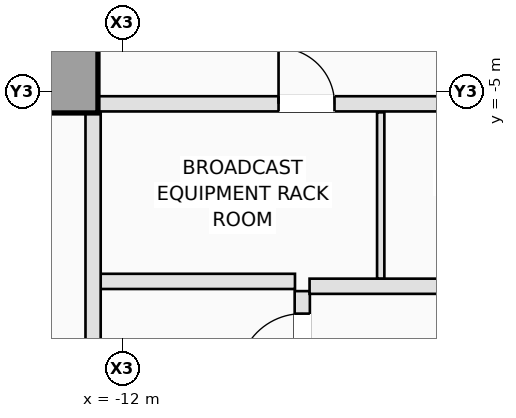
"""IFC4 building model, lengths in metres.
Left out: names, types, materials, properties, quantities, classifications, styles, units other than length and angle.
Written with IfcOpenShell. Run it as: python <this file> out.ifc"""

import sys

from ifc_helpers import new_model, si_unit, direction, frame, frame_2d, origin, origin_2d, place, context, subcontext, project, spatial, rectangle, extrude, element, fill, save


model = new_model("IFC4")
c1 = context("Model", 3, precision=1e-05, world=origin(), true_north=direction((0.0, 1.0)))
c2 = subcontext(c1, "Body", "Model", "MODEL_VIEW")
j1 = project(units=[si_unit("LENGTHUNIT", "METRE"), si_unit("PLANEANGLEUNIT", "RADIAN")], contexts=[c1])
p1 = place(None, origin())
s1 = spatial("IfcSite", under=j1, at=p1, CompositionType="ELEMENT")
p2 = place(p1, origin())
s2 = spatial("IfcBuilding", under=s1, at=p2, CompositionType="ELEMENT")
p3 = place(p2, frame((0.0, 0.0, 116.0)))
s3 = spatial("IfcBuildingStorey", under=s2, at=p3, CompositionType="ELEMENT", Elevation=116.0)
p4 = place(p3, frame((-12.95, -4.8, 0.0), z_axis=(0.0, 0.0, 1.0), x_axis=(1.0, 0.0, 0.0)))
e1 = element("IfcColumn", 1, at=p4, inside=s3, PredefinedType="COLUMN", context=c2, shape_type="SweptSolid", body=[
    extrude(rectangle(XDim=1.1, YDim=1.1, at=origin_2d()), origin(), (0.0, 0.0, 1.0), 3.5),
])
p5 = place(p3, frame((-9.04, -10.18, 0.0), z_axis=(0.0, 0.0, 1.0), x_axis=(0.0, 1.0, 0.0)))
e2 = element("IfcWall", 2, at=p5, inside=s3, PredefinedType="PARTITIONING", context=c2, shape_type="SweptSolid", body=[
    extrude(rectangle(XDim=1.9, YDim=0.25, at=frame_2d((0.95, 0.0))), origin(), (0.0, 0.0, 1.0), 3.25),
])
p6 = place(p5, frame((0.48, 0.0, 0.0)))
e3 = element("IfcOpeningElement", 3, at=p6, cuts=e2, PredefinedType="OPENING", context=c2, shape_type="SweptSolid", body=[
    extrude(rectangle(XDim=1.05, YDim=2.15, at=frame_2d((0.525, 1.075))), frame((0.0, 0.135, 0.0), z_axis=(0.0, -1.0, 0.0), x_axis=(1.0, 0.0, 0.0)), (0.0, 0.0, 1.0), 0.27),
])
p7 = place(p3, frame((-12.38, -8.12, 0.0), z_axis=(0.0, 0.0, 1.0), x_axis=(1.0, 0.0, 0.0)))
e4 = element("IfcWall", 4, at=p7, inside=s3, PredefinedType="PARTITIONING", context=c2, shape_type="SweptSolid", body=[
    extrude(rectangle(XDim=3.22, YDim=0.25, at=frame_2d((1.61, 0.0))), origin(), (0.0, 0.0, 1.0), 3.25),
])
p8 = place(p3, frame((-12.48, -10.18, 0.0), z_axis=(0.0, 0.0, 1.0), x_axis=(0.0, 1.0, 0.0)))
e5 = element("IfcWall", 5, at=p8, inside=s3, PredefinedType="PARTITIONING", context=c2, shape_type="SweptSolid", body=[
    extrude(rectangle(XDim=4.828, YDim=0.25, at=frame_2d((2.414, 0.0))), origin(), (0.0, 0.0, 1.0), 3.25),
])
p9 = place(p3, frame((-8.92, -8.2, 0.0), z_axis=(0.0, 0.0, 1.0), x_axis=(1.0, 0.0, 0.0)))
e6 = element("IfcWall", 6, at=p9, inside=s3, PredefinedType="PARTITIONING", context=c2, shape_type="SweptSolid", body=[
    extrude(rectangle(XDim=5.24, YDim=0.25, at=frame_2d((2.62, 0.0))), origin(), (0.0, 0.0, 1.0), 3.25),
])
p10 = place(p3, frame((-12.398, -5.2, 0.0), z_axis=(0.0, 0.0, 1.0), x_axis=(1.0, 0.0, 0.0)))
e7 = element("IfcWall", 7, at=p10, inside=s3, PredefinedType="PARTITIONING", context=c2, shape_type="SweptSolid", body=[
    extrude(rectangle(XDim=8.096, YDim=0.25, at=frame_2d((4.048, 0.0))), origin(), (0.0, 0.0, 1.0), 3.25),
])
p11 = place(p10, frame((2.968, 0.0, 0.0)))
e8 = element("IfcOpeningElement", 8, at=p11, cuts=e7, PredefinedType="OPENING", context=c2, shape_type="SweptSolid", body=[
    extrude(rectangle(XDim=0.92, YDim=2.12, at=frame_2d((0.46, 1.06))), frame((0.0, 0.135, 0.0), z_axis=(0.0, -1.0, 0.0), x_axis=(1.0, 0.0, 0.0)), (0.0, 0.0, 1.0), 0.27),
])
p12 = place(p10, frame((6.068, 0.0, 0.0)))
e9 = element("IfcOpeningElement", 9, at=p12, cuts=e7, PredefinedType="OPENING", context=c2, shape_type="SweptSolid", body=[
    extrude(rectangle(XDim=0.92, YDim=2.12, at=frame_2d((0.46, 1.06))), frame((0.0, 0.135, 0.0), z_axis=(0.0, -1.0, 0.0), x_axis=(1.0, 0.0, 0.0)), (0.0, 0.0, 1.0), 0.27),
])
p13 = place(p3, frame((-7.75, -8.073, 0.0), z_axis=(0.0, 0.0, 1.0), x_axis=(0.0, 1.0, 0.0)))
e10 = element("IfcWall", 10, at=p13, inside=s3, PredefinedType="PARTITIONING", context=c2, shape_type="SweptSolid", body=[
    extrude(rectangle(XDim=2.733, YDim=0.12, at=frame_2d((1.366, 0.0))), origin(), (0.0, 0.0, 1.0), 3.25),
])
p14 = place(p6, origin())
e11 = element("IfcDoor", 11, at=p14, inside=s3, OperationType="SINGLE_SWING_LEFT", PredefinedType="DOOR", context=c2, shape_type="SweptSolid", body=[
    extrude(rectangle(XDim=1.05, YDim=2.15, at=frame_2d((0.525, 1.075))), frame((0.0, 0.025, 0.0), z_axis=(0.0, -1.0, 0.0), x_axis=(1.0, 0.0, 0.0)), (0.0, 0.0, 1.0), 0.05),
])
fill(e3, e11)
p15 = place(p11, origin())
e12 = element("IfcDoor", 12, at=p15, inside=s3, OperationType="SINGLE_SWING_LEFT", PredefinedType="DOOR", context=c2, shape_type="SweptSolid", body=[
    extrude(rectangle(XDim=0.92, YDim=2.12, at=frame_2d((0.46, 1.06))), frame((0.0, 0.025, 0.0), z_axis=(0.0, -1.0, 0.0), x_axis=(1.0, 0.0, 0.0)), (0.0, 0.0, 1.0), 0.05),
])
fill(e8, e12)
save(model, sys.argv[1])
